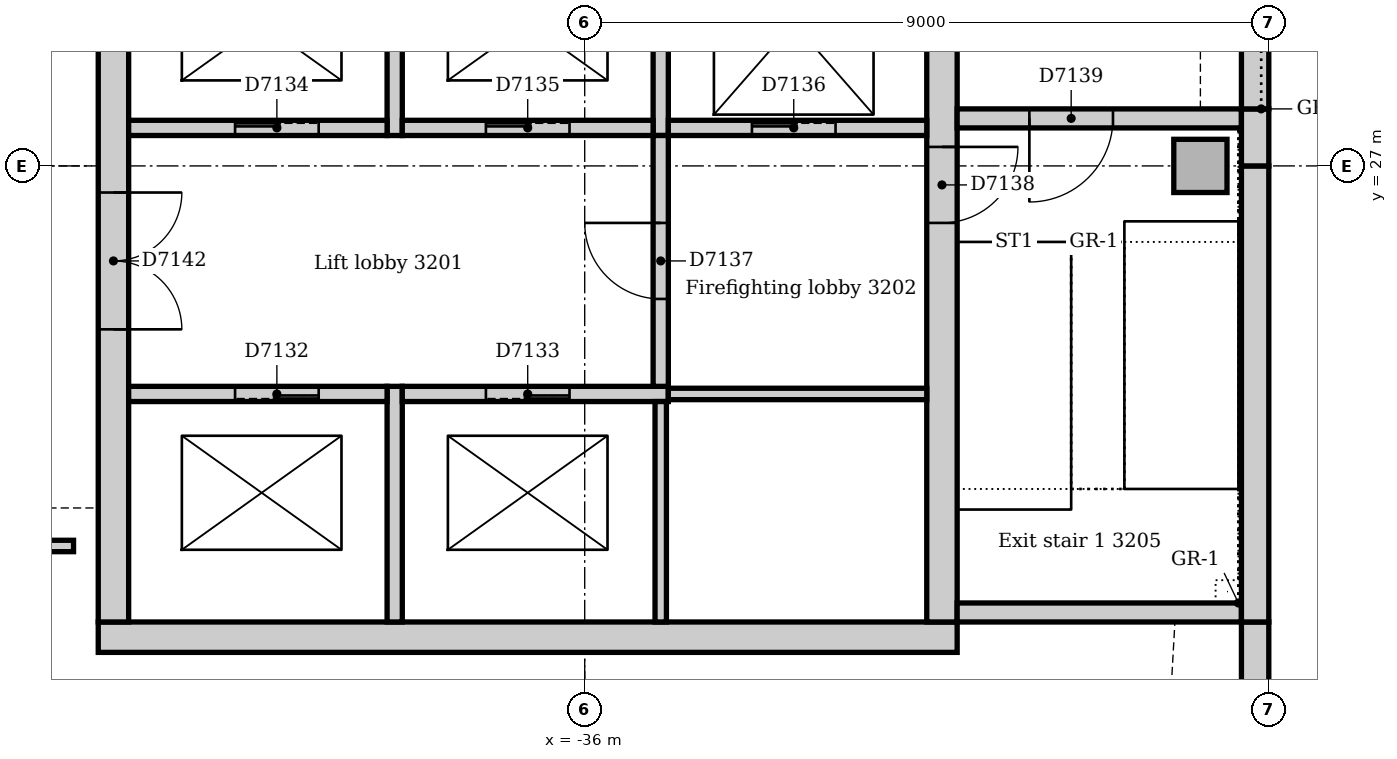
"""IFC4 building model, lengths in metres.
Left out: names, types, materials, properties, quantities, classifications, styles, units other than length and angle.
Written with IfcOpenShell. Run it as: python <this file> out.ifc"""

import sys

from ifc_helpers import new_model, si_unit, direction, frame, frame_2d, origin, origin_2d, place, context, subcontext, project, spatial, rectangle, extrude, element, fill, save


model = new_model("IFC4")
c1 = context("Model", 3, precision=1e-05, world=origin(), true_north=direction((0.0, 1.0)))
c2 = subcontext(c1, "Body", "Model", "MODEL_VIEW")
j1 = project(units=[si_unit("LENGTHUNIT", "METRE"), si_unit("PLANEANGLEUNIT", "RADIAN")], contexts=[c1])
p1 = place(None, origin())
s1 = spatial("IfcSite", under=j1, at=p1, CompositionType="ELEMENT")
p2 = place(p1, origin())
s2 = spatial("IfcBuilding", under=s1, at=p2, CompositionType="ELEMENT")
p3 = place(p2, frame((0.0, 0.0, 136.0)))
s3 = spatial("IfcBuildingStorey", under=s2, at=p3, CompositionType="ELEMENT", Elevation=136.0)
p4 = place(p3, frame((-42.4, 20.8, 0.0), z_axis=(0.0, 0.0, 1.0), x_axis=(1.0, 0.0, 0.0)))
e1 = element("IfcWall", 1, at=p4, inside=s3, PredefinedType="SOLIDWALL", context=c2, shape_type="SweptSolid", body=[
    extrude(rectangle(XDim=11.3, YDim=0.4, at=frame_2d((5.65, 0.0))), origin(), (0.0, 0.0, 1.0), 4.0),
])
p5 = place(p3, frame((-31.3, 21.0, 0.0), z_axis=(0.0, 0.0, 1.0), x_axis=(0.0, 1.0, 0.0)))
e2 = element("IfcWall", 2, at=p5, inside=s3, PredefinedType="SOLIDWALL", context=c2, shape_type="SweptSolid", body=[
    extrude(rectangle(XDim=9.5, YDim=0.4, at=frame_2d((4.75, 0.0))), origin(), (0.0, 0.0, 1.0), 4.0),
])
p6 = place(p5, frame((5.25, 0.0, 0.0)))
e3 = element("IfcOpeningElement", 3, at=p6, cuts=e2, PredefinedType="OPENING", context=c2, shape_type="SweptSolid", body=[
    extrude(rectangle(XDim=1.0, YDim=2.1, at=frame_2d((0.5, 1.05))), frame((0.0, 0.21, 0.0), z_axis=(0.0, -1.0, 0.0), x_axis=(1.0, 0.0, 0.0)), (0.0, 0.0, 1.0), 0.42),
])
p7 = place(p3, frame((-42.2, 30.5, 0.0), z_axis=(0.0, 0.0, 1.0), x_axis=(0.0, -1.0, 0.0)))
e4 = element("IfcWall", 4, at=p7, inside=s3, PredefinedType="SOLIDWALL", context=c2, shape_type="SweptSolid", body=[
    extrude(rectangle(XDim=9.5, YDim=0.4, at=frame_2d((4.75, 0.0))), origin(), (0.0, 0.0, 1.0), 4.0),
])
p8 = place(p7, frame((3.85, 0.0, 0.0)))
e5 = element("IfcOpeningElement", 5, at=p8, cuts=e4, PredefinedType="OPENING", context=c2, shape_type="SweptSolid", body=[
    extrude(rectangle(XDim=1.8, YDim=2.1, at=frame_2d((0.9, 1.05))), frame((0.0, 0.21, 0.0), z_axis=(0.0, -1.0, 0.0), x_axis=(1.0, 0.0, 0.0)), (0.0, 0.0, 1.0), 0.42),
])
p9 = place(p3, frame((-31.1, 21.125, 0.0), z_axis=(0.0, 0.0, 1.0), x_axis=(1.0, 0.0, 0.0)))
e6 = element("IfcWall", 6, at=p9, inside=s3, PredefinedType="SOLIDWALL", context=c2, shape_type="SweptSolid", body=[
    extrude(rectangle(XDim=3.74, YDim=0.25, at=frame_2d((1.87, 0.0))), origin(), (0.0, 0.0, 1.0), 4.0),
])
p10 = place(p3, frame((-27.36, 27.625, 0.0), z_axis=(0.0, 0.0, 1.0), x_axis=(-1.0, 0.0, 0.0)))
e7 = element("IfcWall", 7, at=p10, inside=s3, PredefinedType="SOLIDWALL", context=c2, shape_type="SweptSolid", body=[
    extrude(rectangle(XDim=3.74, YDim=0.25, at=frame_2d((1.87, 0.0))), origin(), (0.0, 0.0, 1.0), 4.0),
])
p11 = place(p10, frame((1.69, 0.0, 0.0)))
e8 = element("IfcOpeningElement", 8, at=p11, cuts=e7, PredefinedType="OPENING", context=c2, shape_type="SweptSolid", body=[
    extrude(rectangle(XDim=1.1, YDim=2.1, at=frame_2d((0.55, 1.05))), frame((0.0, 0.135, 0.0), z_axis=(0.0, -1.0, 0.0), x_axis=(1.0, 0.0, 0.0)), (0.0, 0.0, 1.0), 0.27),
])
p12 = place(p3, frame((-27.9, 27.0, 0.0), z_axis=(0.0, 0.0, 1.0), x_axis=(1.0, 0.0, 0.0)))
e9 = element("IfcColumn", 9, at=p12, inside=s3, PredefinedType="COLUMN", context=c2, shape_type="SweptSolid", body=[
    extrude(rectangle(XDim=0.7, YDim=0.7, at=origin_2d()), origin(), (0.0, 0.0, 1.0), 4.0),
])
p13 = place(p3, frame((-27.18, 17.743, 0.0), z_axis=(0.0, 0.0, 1.0), x_axis=(0.0, 1.0, 0.0)))
e10 = element("IfcWall", 10, at=p13, inside=s3, PredefinedType="STANDARD", context=c2, shape_type="SweptSolid", body=[
    extrude(rectangle(XDim=3.257, YDim=0.36, at=frame_2d((1.629, 0.0))), origin(), (0.0, 0.0, 1.0), 3.85),
])
p14 = place(p3, frame((-27.18, 21.0, 0.0), z_axis=(0.0, 0.0, 1.0), x_axis=(0.0, 1.0, 0.0)))
e11 = element("IfcWall", 11, at=p14, inside=s3, PredefinedType="STANDARD", context=c2, shape_type="SweptSolid", body=[
    extrude(rectangle(XDim=6.0, YDim=0.36, at=frame_2d((3.0, 0.0))), origin(), (0.0, 0.0, 1.0), 3.85),
])
p15 = place(p3, frame((-27.18, 27.0, 0.0), z_axis=(0.0, 0.0, 1.0), x_axis=(0.0, 1.0, 0.0)))
e12 = element("IfcWall", 12, at=p15, inside=s3, PredefinedType="STANDARD", context=c2, shape_type="SweptSolid", body=[
    extrude(rectangle(XDim=0.75, YDim=0.36, at=frame_2d((0.375, 0.0))), origin(), (0.0, 0.0, 1.0), 3.436),
])
p16 = place(p3, frame((-27.18, 27.75, 0.0), z_axis=(0.0, 0.0, 1.0), x_axis=(0.0, 1.0, 0.0)))
e13 = element("IfcWall", 13, at=p16, inside=s3, PredefinedType="STANDARD", context=c2, shape_type="SweptSolid", body=[
    extrude(rectangle(XDim=7.5, YDim=0.36, at=frame_2d((3.75, 0.0))), origin(), (0.0, 0.0, 1.0), 3.436),
])
p17 = place(p16, frame((2.85, 0.0, 1.2)))
e14 = element("IfcOpeningElement", 14, at=p17, cuts=e13, PredefinedType="OPENING", context=c2, shape_type="SweptSolid", body=[
    extrude(rectangle(XDim=1.8, YDim=1.2, at=frame_2d((0.9, 0.6))), frame((0.0, 0.19, 0.0), z_axis=(0.0, -1.0, 0.0), x_axis=(1.0, 0.0, 0.0)), (0.0, 0.0, 1.0), 0.38),
])
p18 = place(p3, frame((-38.5, 21.0, 0.0), z_axis=(0.0, 0.0, 1.0), x_axis=(0.0, 1.0, 0.0)))
e15 = element("IfcWall", 15, at=p18, inside=s3, PredefinedType="SOLIDWALL", context=c2, shape_type="SweptSolid", body=[
    extrude(rectangle(XDim=3.1, YDim=0.2, at=frame_2d((1.55, 0.0))), origin(), (0.0, 0.0, 1.0), 4.0),
])
p19 = place(p3, frame((-38.6, 24.0, 0.0), z_axis=(0.0, 0.0, 1.0), x_axis=(-1.0, 0.0, 0.0)))
e16 = element("IfcWall", 16, at=p19, inside=s3, PredefinedType="SOLIDWALL", context=c2, shape_type="SweptSolid", body=[
    extrude(rectangle(XDim=3.4, YDim=0.2, at=frame_2d((1.7, 0.0))), origin(), (0.0, 0.0, 1.0), 4.0),
])
p20 = place(p19, frame((0.9, 0.0, 0.0)))
e17 = element("IfcOpeningElement", 17, at=p20, cuts=e16, PredefinedType="OPENING", context=c2, shape_type="SweptSolid", body=[
    extrude(rectangle(XDim=1.1, YDim=2.1, at=frame_2d((0.55, 1.05))), frame((0.0, 0.11, 0.0), z_axis=(0.0, -1.0, 0.0), x_axis=(1.0, 0.0, 0.0)), (0.0, 0.0, 1.0), 0.22),
])
p21 = place(p3, frame((-34.9, 24.0, 0.0), z_axis=(0.0, 0.0, 1.0), x_axis=(-1.0, 0.0, 0.0)))
e18 = element("IfcWall", 18, at=p21, inside=s3, PredefinedType="SOLIDWALL", context=c2, shape_type="SweptSolid", body=[
    extrude(rectangle(XDim=3.5, YDim=0.2, at=frame_2d((1.75, 0.0))), origin(), (0.0, 0.0, 1.0), 4.0),
])
p22 = place(p21, frame((1.3, 0.0, 0.0)))
e19 = element("IfcOpeningElement", 19, at=p22, cuts=e18, PredefinedType="OPENING", context=c2, shape_type="SweptSolid", body=[
    extrude(rectangle(XDim=1.1, YDim=2.1, at=frame_2d((0.55, 1.05))), frame((0.0, 0.11, 0.0), z_axis=(0.0, -1.0, 0.0), x_axis=(1.0, 0.0, 0.0)), (0.0, 0.0, 1.0), 0.22),
])
p23 = place(p3, frame((-38.5, 27.4, 0.0), z_axis=(0.0, 0.0, 1.0), x_axis=(0.0, 1.0, 0.0)))
e20 = element("IfcWall", 20, at=p23, inside=s3, PredefinedType="SOLIDWALL", context=c2, shape_type="SweptSolid", body=[
    extrude(rectangle(XDim=2.85, YDim=0.2, at=frame_2d((1.425, 0.0))), origin(), (0.0, 0.0, 1.0), 4.0),
])
p24 = place(p3, frame((-42.0, 27.5, 0.0), z_axis=(0.0, 0.0, 1.0), x_axis=(1.0, 0.0, 0.0)))
e21 = element("IfcWall", 21, at=p24, inside=s3, PredefinedType="SOLIDWALL", context=c2, shape_type="SweptSolid", body=[
    extrude(rectangle(XDim=3.4, YDim=0.2, at=frame_2d((1.7, 0.0))), origin(), (0.0, 0.0, 1.0), 4.0),
])
p25 = place(p24, frame((1.4, 0.0, 0.0)))
e22 = element("IfcOpeningElement", 22, at=p25, cuts=e21, PredefinedType="OPENING", context=c2, shape_type="SweptSolid", body=[
    extrude(rectangle(XDim=1.1, YDim=2.1, at=frame_2d((0.55, 1.05))), frame((0.0, 0.11, 0.0), z_axis=(0.0, -1.0, 0.0), x_axis=(1.0, 0.0, 0.0)), (0.0, 0.0, 1.0), 0.22),
])
p26 = place(p3, frame((-35.0, 27.4, 0.0), z_axis=(0.0, 0.0, 1.0), x_axis=(0.0, 1.0, 0.0)))
e23 = element("IfcWall", 23, at=p26, inside=s3, PredefinedType="SOLIDWALL", context=c2, shape_type="SweptSolid", body=[
    extrude(rectangle(XDim=2.85, YDim=0.2, at=frame_2d((1.425, 0.0))), origin(), (0.0, 0.0, 1.0), 4.0),
])
p27 = place(p3, frame((-38.4, 27.5, 0.0), z_axis=(0.0, 0.0, 1.0), x_axis=(1.0, 0.0, 0.0)))
e24 = element("IfcWall", 24, at=p27, inside=s3, PredefinedType="SOLIDWALL", context=c2, shape_type="SweptSolid", body=[
    extrude(rectangle(XDim=3.3, YDim=0.2, at=frame_2d((1.65, 0.0))), origin(), (0.0, 0.0, 1.0), 4.0),
])
p28 = place(p27, frame((1.1, 0.0, 0.0)))
e25 = element("IfcOpeningElement", 25, at=p28, cuts=e24, PredefinedType="OPENING", context=c2, shape_type="SweptSolid", body=[
    extrude(rectangle(XDim=1.1, YDim=2.1, at=frame_2d((0.55, 1.05))), frame((0.0, 0.11, 0.0), z_axis=(0.0, -1.0, 0.0), x_axis=(1.0, 0.0, 0.0)), (0.0, 0.0, 1.0), 0.22),
])
p29 = place(p3, frame((-34.9, 27.5, 0.0), z_axis=(0.0, 0.0, 1.0), x_axis=(1.0, 0.0, 0.0)))
e26 = element("IfcWall", 26, at=p29, inside=s3, PredefinedType="SOLIDWALL", context=c2, shape_type="SweptSolid", body=[
    extrude(rectangle(XDim=3.4, YDim=0.2, at=frame_2d((1.7, 0.0))), origin(), (0.0, 0.0, 1.0), 4.0),
])
p30 = place(p29, frame((1.1, 0.0, 0.0)))
e27 = element("IfcOpeningElement", 27, at=p30, cuts=e26, PredefinedType="OPENING", context=c2, shape_type="SweptSolid", body=[
    extrude(rectangle(XDim=1.1, YDim=2.1, at=frame_2d((0.55, 1.05))), frame((0.0, 0.11, 0.0), z_axis=(0.0, -1.0, 0.0), x_axis=(1.0, 0.0, 0.0)), (0.0, 0.0, 1.0), 0.22),
])
p31 = place(p3, frame((-35.0, 24.1, 0.0), z_axis=(0.0, 0.0, 1.0), x_axis=(0.0, 1.0, 0.0)))
e28 = element("IfcWall", 28, at=p31, inside=s3, PredefinedType="SOLIDWALL", context=c2, shape_type="SweptSolid", body=[
    extrude(rectangle(XDim=3.3, YDim=0.2, at=frame_2d((1.65, 0.0))), origin(), (0.0, 0.0, 1.0), 4.0),
])
p32 = place(p31, frame((1.15, 0.0, 0.0)))
e29 = element("IfcOpeningElement", 29, at=p32, cuts=e28, PredefinedType="OPENING", context=c2, shape_type="SweptSolid", body=[
    extrude(rectangle(XDim=1.0, YDim=2.1, at=frame_2d((0.5, 1.05))), frame((0.0, 0.11, 0.0), z_axis=(0.0, -1.0, 0.0), x_axis=(1.0, 0.0, 0.0)), (0.0, 0.0, 1.0), 0.22),
])
p33 = place(p3, frame((-35.0, 21.0, 0.0), z_axis=(0.0, 0.0, 1.0), x_axis=(0.0, 1.0, 0.0)))
e30 = element("IfcWall", 30, at=p33, inside=s3, PredefinedType="SOLIDWALL", context=c2, shape_type="SweptSolid", body=[
    extrude(rectangle(XDim=2.9, YDim=0.15, at=frame_2d((1.45, 0.0))), origin(), (0.0, 0.0, 1.0), 4.0),
])
p34 = place(p3, frame((-31.5, 24.0, 0.0), z_axis=(0.0, 0.0, 1.0), x_axis=(-1.0, 0.0, 0.0)))
e31 = element("IfcWall", 31, at=p34, inside=s3, PredefinedType="SOLIDWALL", context=c2, shape_type="SweptSolid", body=[
    extrude(rectangle(XDim=3.4, YDim=0.15, at=frame_2d((1.7, 0.0))), origin(), (0.0, 0.0, 1.0), 4.0),
])
p35 = place(p3, frame((-59.766, 22.0, 0.0), z_axis=(0.0, 0.0, 1.0), x_axis=(1.0, 0.0, 0.0)))
e32 = element("IfcWall", 32, at=p35, inside=s3, PredefinedType="PARTITIONING", context=c2, shape_type="SweptSolid", body=[
    extrude(rectangle(XDim=17.041, YDim=0.15, at=frame_2d((8.52, 0.0))), origin(), (0.0, 0.0, 1.0), 3.85),
])
p36 = place(p35, frame((15.366, 0.0, 0.0)))
e33 = element("IfcOpeningElement", 33, at=p36, cuts=e32, PredefinedType="OPENING", context=c2, shape_type="SweptSolid", body=[
    extrude(rectangle(XDim=0.9, YDim=2.1, at=frame_2d((0.45, 1.05))), frame((0.0, 0.085, 0.0), z_axis=(0.0, -1.0, 0.0), x_axis=(1.0, 0.0, 0.0)), (0.0, 0.0, 1.0), 0.17),
])
p37 = place(p35, frame((2.5, 0.0, 0.0)))
e34 = element("IfcOpeningElement", 34, at=p37, cuts=e32, PredefinedType="OPENING", context=c2, shape_type="SweptSolid", body=[
    extrude(rectangle(XDim=0.9, YDim=2.1, at=frame_2d((0.45, 1.05))), frame((0.0, 0.085, 0.0), z_axis=(0.0, -1.0, 0.0), x_axis=(1.0, 0.0, 0.0)), (0.0, 0.0, 1.0), 0.17),
])
p38 = place(p35, frame((9.056, 0.0, 0.0)))
e35 = element("IfcOpeningElement", 35, at=p38, cuts=e32, PredefinedType="OPENING", context=c2, shape_type="SweptSolid", body=[
    extrude(rectangle(XDim=1.0, YDim=2.1, at=frame_2d((0.5, 1.05))), frame((0.0, 0.085, 0.0), z_axis=(0.0, -1.0, 0.0), x_axis=(1.0, 0.0, 0.0)), (0.0, 0.0, 1.0), 0.17),
])
p39 = place(p20, origin())
e36 = element("IfcDoor", 36, at=p39, inside=s3, OperationType="SLIDING_TO_LEFT", PredefinedType="DOOR", context=c2, shape_type="SweptSolid", body=[
    extrude(rectangle(XDim=1.1, YDim=2.1, at=frame_2d((0.55, 1.05))), frame((0.0, 0.025, 0.0), z_axis=(0.0, -1.0, 0.0), x_axis=(1.0, 0.0, 0.0)), (0.0, 0.0, 1.0), 0.05),
])
fill(e17, e36)
p40 = place(p22, origin())
e37 = element("IfcDoor", 37, at=p40, inside=s3, OperationType="SLIDING_TO_LEFT", PredefinedType="DOOR", context=c2, shape_type="SweptSolid", body=[
    extrude(rectangle(XDim=1.1, YDim=2.1, at=frame_2d((0.55, 1.05))), frame((0.0, 0.025, 0.0), z_axis=(0.0, -1.0, 0.0), x_axis=(1.0, 0.0, 0.0)), (0.0, 0.0, 1.0), 0.05),
])
fill(e19, e37)
p41 = place(p25, origin())
e38 = element("IfcDoor", 38, at=p41, inside=s3, OperationType="SLIDING_TO_LEFT", PredefinedType="DOOR", context=c2, shape_type="SweptSolid", body=[
    extrude(rectangle(XDim=1.1, YDim=2.1, at=frame_2d((0.55, 1.05))), frame((0.0, 0.025, 0.0), z_axis=(0.0, -1.0, 0.0), x_axis=(1.0, 0.0, 0.0)), (0.0, 0.0, 1.0), 0.05),
])
fill(e22, e38)
p42 = place(p28, origin())
e39 = element("IfcDoor", 39, at=p42, inside=s3, OperationType="SLIDING_TO_LEFT", PredefinedType="DOOR", context=c2, shape_type="SweptSolid", body=[
    extrude(rectangle(XDim=1.1, YDim=2.1, at=frame_2d((0.55, 1.05))), frame((0.0, 0.025, 0.0), z_axis=(0.0, -1.0, 0.0), x_axis=(1.0, 0.0, 0.0)), (0.0, 0.0, 1.0), 0.05),
])
fill(e25, e39)
p43 = place(p30, origin())
e40 = element("IfcDoor", 40, at=p43, inside=s3, OperationType="SLIDING_TO_LEFT", PredefinedType="DOOR", context=c2, shape_type="SweptSolid", body=[
    extrude(rectangle(XDim=1.1, YDim=2.1, at=frame_2d((0.55, 1.05))), frame((0.0, 0.025, 0.0), z_axis=(0.0, -1.0, 0.0), x_axis=(1.0, 0.0, 0.0)), (0.0, 0.0, 1.0), 0.05),
])
fill(e27, e40)
p44 = place(p32, origin())
e41 = element("IfcDoor", 41, at=p44, inside=s3, OperationType="SINGLE_SWING_RIGHT", PredefinedType="DOOR", context=c2, shape_type="SweptSolid", body=[
    extrude(rectangle(XDim=1.0, YDim=2.1, at=frame_2d((0.5, 1.05))), frame((0.0, 0.025, 0.0), z_axis=(0.0, -1.0, 0.0), x_axis=(1.0, 0.0, 0.0)), (0.0, 0.0, 1.0), 0.05),
])
fill(e29, e41)
p45 = place(p6, frame((1.0, 0.0, 0.0), z_axis=(0.0, 0.0, 1.0), x_axis=(-1.0, 0.0, 0.0)))
e42 = element("IfcDoor", 42, at=p45, inside=s3, OperationType="SINGLE_SWING_LEFT", PredefinedType="DOOR", context=c2, shape_type="SweptSolid", body=[
    extrude(rectangle(XDim=1.0, YDim=2.1, at=frame_2d((0.5, 1.05))), frame((0.0, 0.025, 0.0), z_axis=(0.0, -1.0, 0.0), x_axis=(1.0, 0.0, 0.0)), (0.0, 0.0, 1.0), 0.05),
])
fill(e3, e42)
p46 = place(p11, origin())
e43 = element("IfcDoor", 43, at=p46, inside=s3, OperationType="SINGLE_SWING_RIGHT", PredefinedType="DOOR", context=c2, shape_type="SweptSolid", body=[
    extrude(rectangle(XDim=1.1, YDim=2.1, at=frame_2d((0.55, 1.05))), frame((0.0, 0.025, 0.0), z_axis=(0.0, -1.0, 0.0), x_axis=(1.0, 0.0, 0.0)), (0.0, 0.0, 1.0), 0.05),
])
fill(e8, e43)
p47 = place(p8, origin())
e44 = element("IfcDoor", 44, at=p47, inside=s3, OperationType="DOUBLE_DOOR_SINGLE_SWING", PredefinedType="DOOR", context=c2, shape_type="SweptSolid", body=[
    extrude(rectangle(XDim=1.8, YDim=2.1, at=frame_2d((0.9, 1.05))), frame((0.0, 0.025, 0.0), z_axis=(0.0, -1.0, 0.0), x_axis=(1.0, 0.0, 0.0)), (0.0, 0.0, 1.0), 0.05),
])
fill(e5, e44)
save(model, sys.argv[1])
